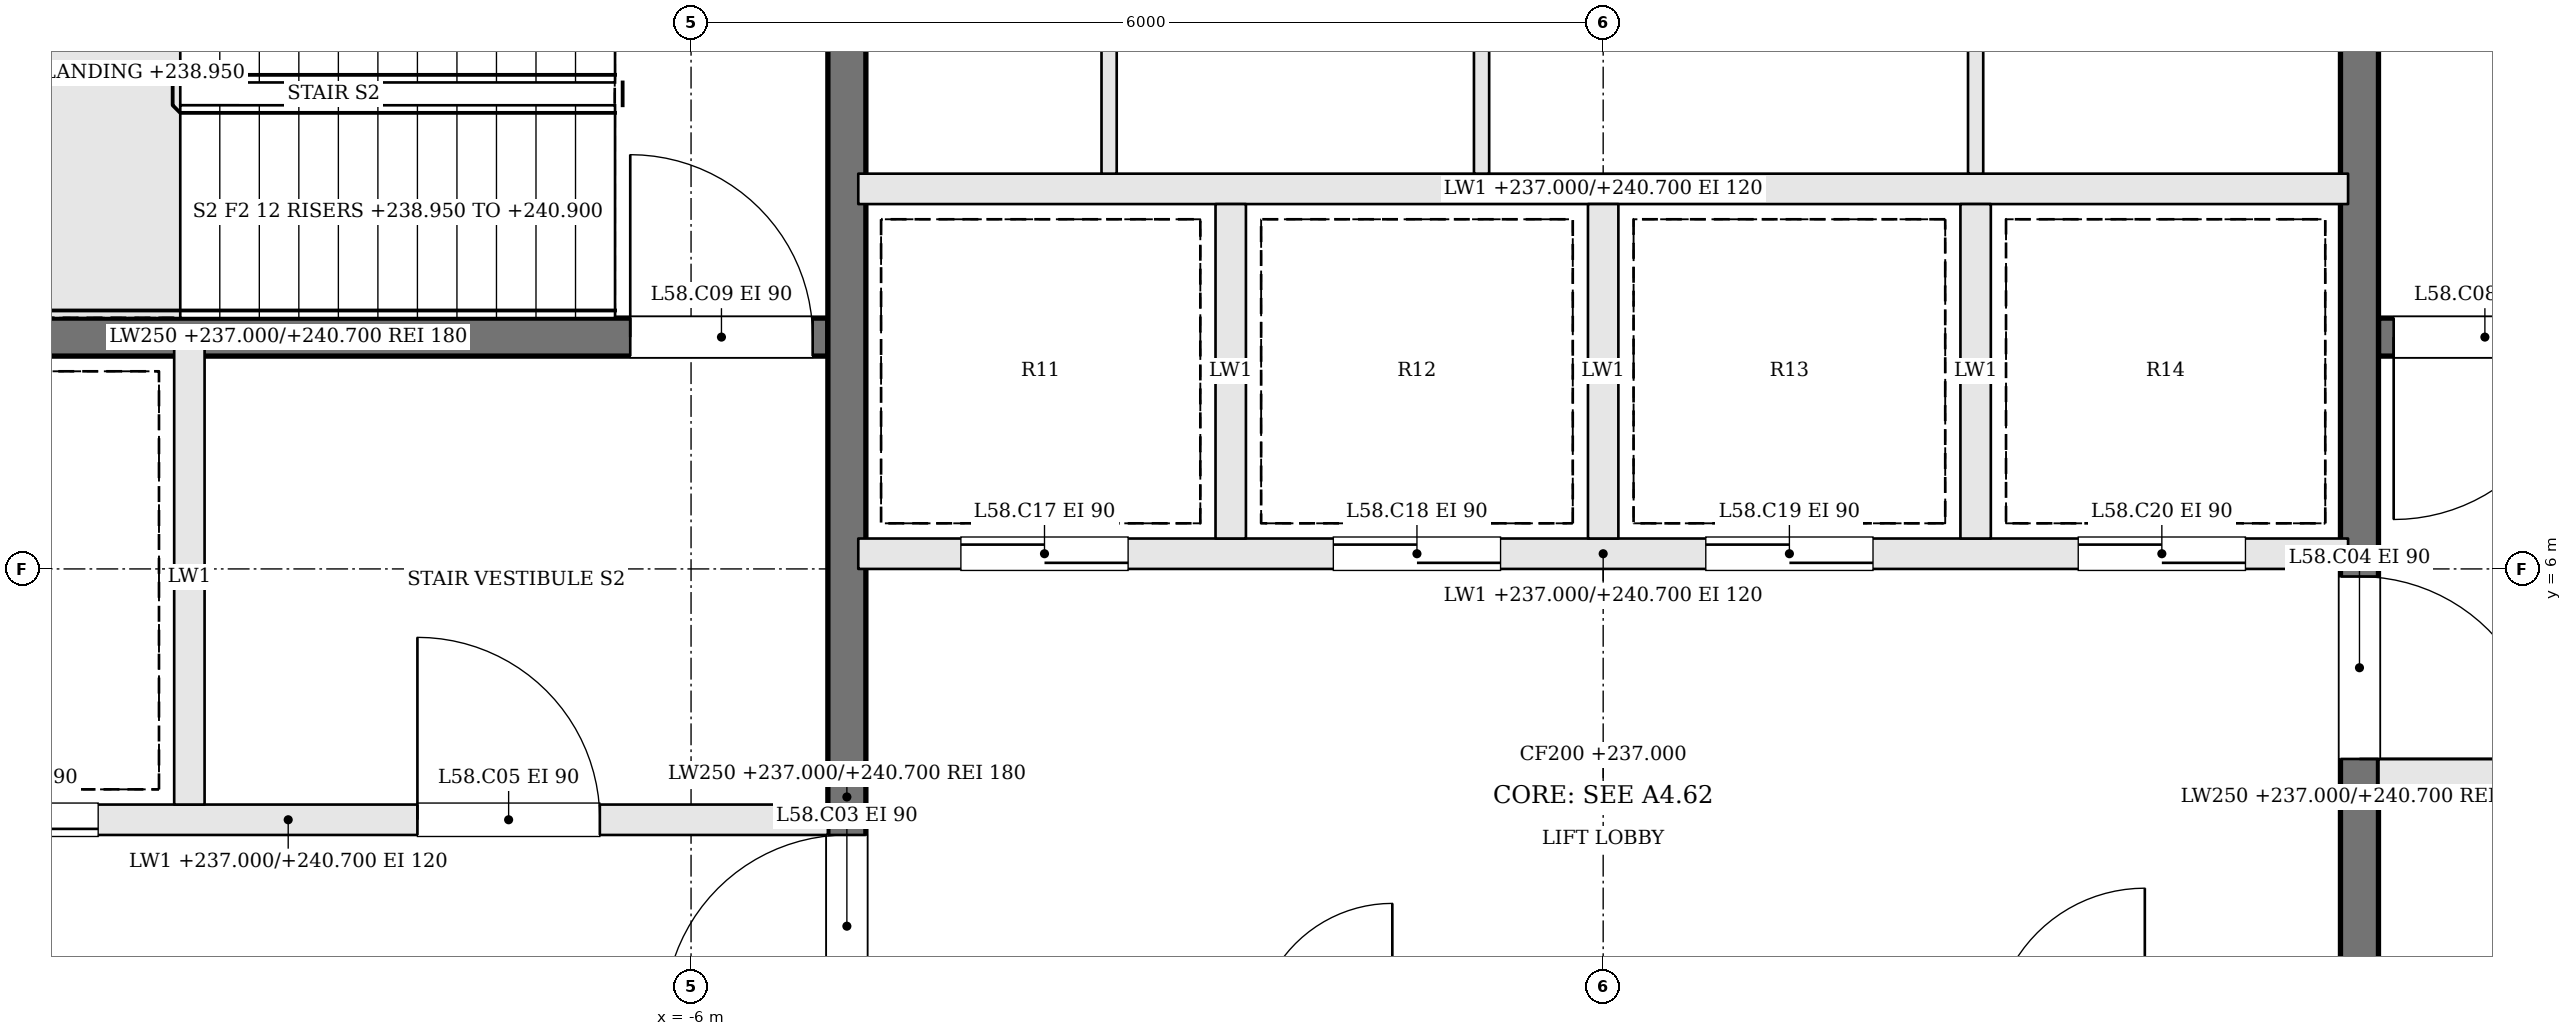
"""IFC4 building model, lengths in metres.
Left out: names, types, materials, properties, quantities, classifications, styles, units other than length and angle.
Written with IfcOpenShell. Run it as: python <this file> out.ifc"""

import sys

from ifc_helpers import new_model, si_unit, direction, frame, frame_2d, origin, place, context, subcontext, project, spatial, rectangle, extrude, element, fill, save


model = new_model("IFC4")
c1 = context("Model", 3, precision=1e-05, world=origin(), true_north=direction((0.0, 1.0)))
c2 = subcontext(c1, "Body", "Model", "MODEL_VIEW")
j1 = project(units=[si_unit("LENGTHUNIT", "METRE"), si_unit("PLANEANGLEUNIT", "RADIAN")], contexts=[c1])
p1 = place(None, origin())
s1 = spatial("IfcSite", under=j1, at=p1, CompositionType="ELEMENT")
p2 = place(p1, origin())
s2 = spatial("IfcBuilding", under=s1, at=p2, CompositionType="ELEMENT")
p3 = place(p2, frame((0.0, 0.0, 237.0)))
s3 = spatial("IfcBuildingStorey", under=s2, at=p3, CompositionType="ELEMENT", Elevation=237.0)
p4 = place(p3, frame((12.2, 7.525, 0.0), z_axis=(0.0, 0.0, 1.0), x_axis=(-1.0, 0.0, 0.0)))
e1 = element("IfcWall", 1, at=p4, inside=s3, PredefinedType="SOLIDWALL", context=c2, shape_type="SweptSolid", body=[
    extrude(rectangle(XDim=7.1, YDim=0.25, at=frame_2d((3.55, 0.0))), origin(), (0.0, 0.0, 1.0), 3.7),
])
p5 = place(p4, frame((5.8, 0.0, 0.0)))
e2 = element("IfcOpeningElement", 2, at=p5, cuts=e1, PredefinedType="OPENING", context=c2, shape_type="SweptSolid", body=[
    extrude(rectangle(XDim=1.2, YDim=2.1, at=frame_2d((0.6, 1.05))), frame((0.0, 0.135, 0.0), z_axis=(0.0, -1.0, 0.0), x_axis=(1.0, 0.0, 0.0)), (0.0, 0.0, 1.0), 0.27),
])
p6 = place(p3, frame((-12.2, 4.35, 0.0), z_axis=(0.0, 0.0, 1.0), x_axis=(1.0, 0.0, 0.0)))
e3 = element("IfcWall", 3, at=p6, inside=s3, PredefinedType="SOLIDWALL", context=c2, shape_type="SweptSolid", body=[
    extrude(rectangle(XDim=7.1, YDim=0.2, at=frame_2d((3.55, 0.0))), origin(), (0.0, 0.0, 1.0), 3.7),
])
p7 = place(p6, frame((4.4, 0.0, 0.0)))
e4 = element("IfcOpeningElement", 4, at=p7, cuts=e3, PredefinedType="OPENING", context=c2, shape_type="SweptSolid", body=[
    extrude(rectangle(XDim=1.2, YDim=2.1, at=frame_2d((0.6, 1.05))), frame((0.0, 0.11, 0.0), z_axis=(0.0, -1.0, 0.0), x_axis=(1.0, 0.0, 0.0)), (0.0, 0.0, 1.0), 0.22),
])
p8 = place(p6, frame((1.1, 0.0, 0.0)))
e5 = element("IfcOpeningElement", 5, at=p8, cuts=e3, PredefinedType="OPENING", context=c2, shape_type="SweptSolid", body=[
    extrude(rectangle(XDim=1.2, YDim=2.1, at=frame_2d((0.6, 1.05))), frame((0.0, 0.11, 0.0), z_axis=(0.0, -1.0, 0.0), x_axis=(1.0, 0.0, 0.0)), (0.0, 0.0, 1.0), 0.22),
])
p9 = place(p3, frame((12.2, 4.65, 0.0), z_axis=(0.0, 0.0, 1.0), x_axis=(-1.0, 0.0, 0.0)))
e6 = element("IfcWall", 6, at=p9, inside=s3, PredefinedType="SOLIDWALL", context=c2, shape_type="SweptSolid", body=[
    extrude(rectangle(XDim=7.1, YDim=0.2, at=frame_2d((3.55, 0.0))), origin(), (0.0, 0.0, 1.0), 3.7),
])
p10 = place(p9, frame((4.4, 0.0, 0.0)))
e7 = element("IfcOpeningElement", 7, at=p10, cuts=e6, PredefinedType="OPENING", context=c2, shape_type="SweptSolid", body=[
    extrude(rectangle(XDim=1.2, YDim=2.1, at=frame_2d((0.6, 1.05))), frame((0.0, 0.11, 0.0), z_axis=(0.0, -1.0, 0.0), x_axis=(1.0, 0.0, 0.0)), (0.0, 0.0, 1.0), 0.22),
])
p11 = place(p9, frame((1.1, 0.0, 0.0)))
e8 = element("IfcOpeningElement", 8, at=p11, cuts=e6, PredefinedType="OPENING", context=c2, shape_type="SweptSolid", body=[
    extrude(rectangle(XDim=1.2, YDim=2.1, at=frame_2d((0.6, 1.05))), frame((0.0, 0.11, 0.0), z_axis=(0.0, -1.0, 0.0), x_axis=(1.0, 0.0, 0.0)), (0.0, 0.0, 1.0), 0.22),
])
p12 = place(p3, frame((-12.2, 7.525, 0.0), z_axis=(0.0, 0.0, 1.0), x_axis=(1.0, 0.0, 0.0)))
e9 = element("IfcWall", 9, at=p12, inside=s3, PredefinedType="SOLIDWALL", context=c2, shape_type="SweptSolid", body=[
    extrude(rectangle(XDim=7.1, YDim=0.25, at=frame_2d((3.55, 0.0))), origin(), (0.0, 0.0, 1.0), 3.7),
])
p13 = place(p12, frame((5.8, 0.0, 0.0)))
e10 = element("IfcOpeningElement", 10, at=p13, cuts=e9, PredefinedType="OPENING", context=c2, shape_type="SweptSolid", body=[
    extrude(rectangle(XDim=1.2, YDim=2.1, at=frame_2d((0.6, 1.05))), frame((0.0, 0.135, 0.0), z_axis=(0.0, -1.0, 0.0), x_axis=(1.0, 0.0, 0.0)), (0.0, 0.0, 1.0), 0.27),
])
p14 = place(p3, frame((-9.3, 4.45, 0.0), z_axis=(0.0, 0.0, 1.0), x_axis=(0.0, 1.0, 0.0)))
e11 = element("IfcWall", 11, at=p14, inside=s3, PredefinedType="SOLIDWALL", context=c2, shape_type="SweptSolid", body=[
    extrude(rectangle(XDim=3.0, YDim=0.2, at=frame_2d((1.5, 0.0))), origin(), (0.0, 0.0, 1.0), 3.7),
])
p15 = place(p3, frame((-4.975, -2.2, 0.0), z_axis=(0.0, 0.0, 1.0), x_axis=(0.0, 1.0, 0.0)))
e12 = element("IfcWall", 12, at=p15, inside=s3, PredefinedType="SOLIDWALL", context=c2, shape_type="SweptSolid", body=[
    extrude(rectangle(XDim=13.4, YDim=0.25, at=frame_2d((6.7, 0.0))), origin(), (0.0, 0.0, 1.0), 3.7),
])
p16 = place(p15, frame((5.25, 0.0, 0.0)))
e13 = element("IfcOpeningElement", 13, at=p16, cuts=e12, PredefinedType="OPENING", context=c2, shape_type="SweptSolid", body=[
    extrude(rectangle(XDim=1.2, YDim=2.1, at=frame_2d((0.6, 1.05))), frame((0.0, 0.135, 0.0), z_axis=(0.0, -1.0, 0.0), x_axis=(1.0, 0.0, 0.0)), (0.0, 0.0, 1.0), 0.27),
])
p17 = place(p3, frame((4.975, 11.2, 0.0), z_axis=(0.0, 0.0, 1.0), x_axis=(0.0, -1.0, 0.0)))
e14 = element("IfcWall", 14, at=p17, inside=s3, PredefinedType="SOLIDWALL", context=c2, shape_type="SweptSolid", body=[
    extrude(rectangle(XDim=13.4, YDim=0.25, at=frame_2d((6.7, 0.0))), origin(), (0.0, 0.0, 1.0), 3.7),
])
p18 = place(p17, frame((5.25, 0.0, 0.0)))
e15 = element("IfcOpeningElement", 15, at=p18, cuts=e14, PredefinedType="OPENING", context=c2, shape_type="SweptSolid", body=[
    extrude(rectangle(XDim=1.2, YDim=2.1, at=frame_2d((0.6, 1.05))), frame((0.0, 0.135, 0.0), z_axis=(0.0, -1.0, 0.0), x_axis=(1.0, 0.0, 0.0)), (0.0, 0.0, 1.0), 0.27),
])
p19 = place(p3, frame((-4.9, 6.1, 0.0), z_axis=(0.0, 0.0, 1.0), x_axis=(1.0, 0.0, 0.0)))
e16 = element("IfcWall", 16, at=p19, inside=s3, PredefinedType="SOLIDWALL", context=c2, shape_type="SweptSolid", body=[
    extrude(rectangle(XDim=9.8, YDim=0.2, at=frame_2d((4.9, 0.0))), origin(), (0.0, 0.0, 1.0), 3.7),
])
p20 = place(p19, frame((0.675, 0.0, 0.0)))
e17 = element("IfcOpeningElement", 17, at=p20, cuts=e16, PredefinedType="OPENING", context=c2, shape_type="SweptSolid", body=[
    extrude(rectangle(XDim=1.1, YDim=2.1, at=frame_2d((0.55, 1.05))), frame((0.0, 0.11, 0.0), z_axis=(0.0, -1.0, 0.0), x_axis=(1.0, 0.0, 0.0)), (0.0, 0.0, 1.0), 0.22),
])
p21 = place(p19, frame((3.125, 0.0, 0.0)))
e18 = element("IfcOpeningElement", 18, at=p21, cuts=e16, PredefinedType="OPENING", context=c2, shape_type="SweptSolid", body=[
    extrude(rectangle(XDim=1.1, YDim=2.1, at=frame_2d((0.55, 1.05))), frame((0.0, 0.11, 0.0), z_axis=(0.0, -1.0, 0.0), x_axis=(1.0, 0.0, 0.0)), (0.0, 0.0, 1.0), 0.22),
])
p22 = place(p19, frame((5.575, 0.0, 0.0)))
e19 = element("IfcOpeningElement", 19, at=p22, cuts=e16, PredefinedType="OPENING", context=c2, shape_type="SweptSolid", body=[
    extrude(rectangle(XDim=1.1, YDim=2.1, at=frame_2d((0.55, 1.05))), frame((0.0, 0.11, 0.0), z_axis=(0.0, -1.0, 0.0), x_axis=(1.0, 0.0, 0.0)), (0.0, 0.0, 1.0), 0.22),
])
p23 = place(p19, frame((8.025, 0.0, 0.0)))
e20 = element("IfcOpeningElement", 20, at=p23, cuts=e16, PredefinedType="OPENING", context=c2, shape_type="SweptSolid", body=[
    extrude(rectangle(XDim=1.1, YDim=2.1, at=frame_2d((0.55, 1.05))), frame((0.0, 0.11, 0.0), z_axis=(0.0, -1.0, 0.0), x_axis=(1.0, 0.0, 0.0)), (0.0, 0.0, 1.0), 0.22),
])
p24 = place(p3, frame((-4.9, 8.5, 0.0), z_axis=(0.0, 0.0, 1.0), x_axis=(1.0, 0.0, 0.0)))
e21 = element("IfcWall", 21, at=p24, inside=s3, PredefinedType="SOLIDWALL", context=c2, shape_type="SweptSolid", body=[
    extrude(rectangle(XDim=9.8, YDim=0.2, at=frame_2d((4.9, 0.0))), origin(), (0.0, 0.0, 1.0), 3.7),
])
for number, where, z_axis, x_axis in (
    (22, (-2.45, 6.2, 0.0), (0.0, 0.0, 1.0), (0.0, 1.0, 0.0)),
    (23, (0.0, 6.2, 0.0), (0.0, 0.0, 1.0), (0.0, 1.0, 0.0)),
    (24, (2.45, 6.2, 0.0), (0.0, 0.0, 1.0), (0.0, 1.0, 0.0)),
):
    element("IfcWall", number, at=place(p3, frame(where, z_axis=z_axis, x_axis=x_axis)), inside=s3, PredefinedType="SOLIDWALL", context=c2, shape_type="SweptSolid", body=[
        extrude(rectangle(XDim=2.2, YDim=0.2, at=frame_2d((1.1, 0.0))), origin(), (0.0, 0.0, 1.0), 3.7),
    ])
for number, where, z_axis, x_axis in (
    (25, (-3.25, 8.6, 0.0), (0.0, 0.0, 1.0), (0.0, 1.0, 0.0)),
    (26, (-0.8, 8.6, 0.0), (0.0, 0.0, 1.0), (0.0, 1.0, 0.0)),
    (27, (2.45, 8.6, 0.0), (0.0, 0.0, 1.0), (0.0, 1.0, 0.0)),
):
    element("IfcWall", number, at=place(p3, frame(where, z_axis=z_axis, x_axis=x_axis)), inside=s3, PredefinedType="PARTITIONING", context=c2, shape_type="SweptSolid", body=[
        extrude(rectangle(XDim=2.6, YDim=0.1, at=frame_2d((1.3, 0.0))), origin(), (0.0, 0.0, 1.0), 3.7),
    ])
p25 = place(p16, origin())
e28 = element("IfcDoor", 28, at=p25, inside=s3, OperationType="SINGLE_SWING_LEFT", PredefinedType="DOOR", context=c2, shape_type="SweptSolid", body=[
    extrude(rectangle(XDim=1.2, YDim=2.1, at=frame_2d((0.6, 1.05))), frame((0.0, 0.025, 0.0), z_axis=(0.0, -1.0, 0.0), x_axis=(1.0, 0.0, 0.0)), (0.0, 0.0, 1.0), 0.05),
])
fill(e13, e28)
p26 = place(p18, origin())
e29 = element("IfcDoor", 29, at=p26, inside=s3, OperationType="SINGLE_SWING_RIGHT", PredefinedType="DOOR", context=c2, shape_type="SweptSolid", body=[
    extrude(rectangle(XDim=1.2, YDim=2.1, at=frame_2d((0.6, 1.05))), frame((0.0, 0.025, 0.0), z_axis=(0.0, -1.0, 0.0), x_axis=(1.0, 0.0, 0.0)), (0.0, 0.0, 1.0), 0.05),
])
fill(e15, e29)
p27 = place(p7, origin())
e30 = element("IfcDoor", 30, at=p27, inside=s3, OperationType="SINGLE_SWING_LEFT", PredefinedType="DOOR", context=c2, shape_type="SweptSolid", body=[
    extrude(rectangle(XDim=1.2, YDim=2.1, at=frame_2d((0.6, 1.05))), frame((0.0, 0.025, 0.0), z_axis=(0.0, -1.0, 0.0), x_axis=(1.0, 0.0, 0.0)), (0.0, 0.0, 1.0), 0.05),
])
fill(e4, e30)
p28 = place(p5, origin())
e31 = element("IfcDoor", 31, at=p28, inside=s3, OperationType="SINGLE_SWING_RIGHT", PredefinedType="DOOR", context=c2, shape_type="SweptSolid", body=[
    extrude(rectangle(XDim=1.2, YDim=2.1, at=frame_2d((0.6, 1.05))), frame((0.0, 0.025, 0.0), z_axis=(0.0, -1.0, 0.0), x_axis=(1.0, 0.0, 0.0)), (0.0, 0.0, 1.0), 0.05),
])
fill(e2, e31)
p29 = place(p13, origin())
e32 = element("IfcDoor", 32, at=p29, inside=s3, OperationType="SINGLE_SWING_LEFT", PredefinedType="DOOR", context=c2, shape_type="SweptSolid", body=[
    extrude(rectangle(XDim=1.2, YDim=2.1, at=frame_2d((0.6, 1.05))), frame((0.0, 0.025, 0.0), z_axis=(0.0, -1.0, 0.0), x_axis=(1.0, 0.0, 0.0)), (0.0, 0.0, 1.0), 0.05),
])
fill(e10, e32)
p30 = place(p8, origin())
e33 = element("IfcDoor", 33, at=p30, inside=s3, OperationType="SLIDING_TO_RIGHT", PredefinedType="DOOR", context=c2, shape_type="SweptSolid", body=[
    extrude(rectangle(XDim=1.2, YDim=2.1, at=frame_2d((0.6, 1.05))), frame((0.0, 0.025, 0.0), z_axis=(0.0, -1.0, 0.0), x_axis=(1.0, 0.0, 0.0)), (0.0, 0.0, 1.0), 0.05),
])
fill(e5, e33)
p31 = place(p20, origin())
e34 = element("IfcDoor", 34, at=p31, inside=s3, OperationType="SLIDING_TO_RIGHT", PredefinedType="DOOR", context=c2, shape_type="SweptSolid", body=[
    extrude(rectangle(XDim=1.1, YDim=2.1, at=frame_2d((0.55, 1.05))), frame((0.0, 0.025, 0.0), z_axis=(0.0, -1.0, 0.0), x_axis=(1.0, 0.0, 0.0)), (0.0, 0.0, 1.0), 0.05),
])
fill(e17, e34)
p32 = place(p21, origin())
e35 = element("IfcDoor", 35, at=p32, inside=s3, OperationType="SLIDING_TO_LEFT", PredefinedType="DOOR", context=c2, shape_type="SweptSolid", body=[
    extrude(rectangle(XDim=1.1, YDim=2.1, at=frame_2d((0.55, 1.05))), frame((0.0, 0.025, 0.0), z_axis=(0.0, -1.0, 0.0), x_axis=(1.0, 0.0, 0.0)), (0.0, 0.0, 1.0), 0.05),
])
fill(e18, e35)
p33 = place(p22, origin())
e36 = element("IfcDoor", 36, at=p33, inside=s3, OperationType="SLIDING_TO_RIGHT", PredefinedType="DOOR", context=c2, shape_type="SweptSolid", body=[
    extrude(rectangle(XDim=1.1, YDim=2.1, at=frame_2d((0.55, 1.05))), frame((0.0, 0.025, 0.0), z_axis=(0.0, -1.0, 0.0), x_axis=(1.0, 0.0, 0.0)), (0.0, 0.0, 1.0), 0.05),
])
fill(e19, e36)
p34 = place(p23, origin())
e37 = element("IfcDoor", 37, at=p34, inside=s3, OperationType="SLIDING_TO_LEFT", PredefinedType="DOOR", context=c2, shape_type="SweptSolid", body=[
    extrude(rectangle(XDim=1.1, YDim=2.1, at=frame_2d((0.55, 1.05))), frame((0.0, 0.025, 0.0), z_axis=(0.0, -1.0, 0.0), x_axis=(1.0, 0.0, 0.0)), (0.0, 0.0, 1.0), 0.05),
])
fill(e20, e37)
save(model, sys.argv[1])
